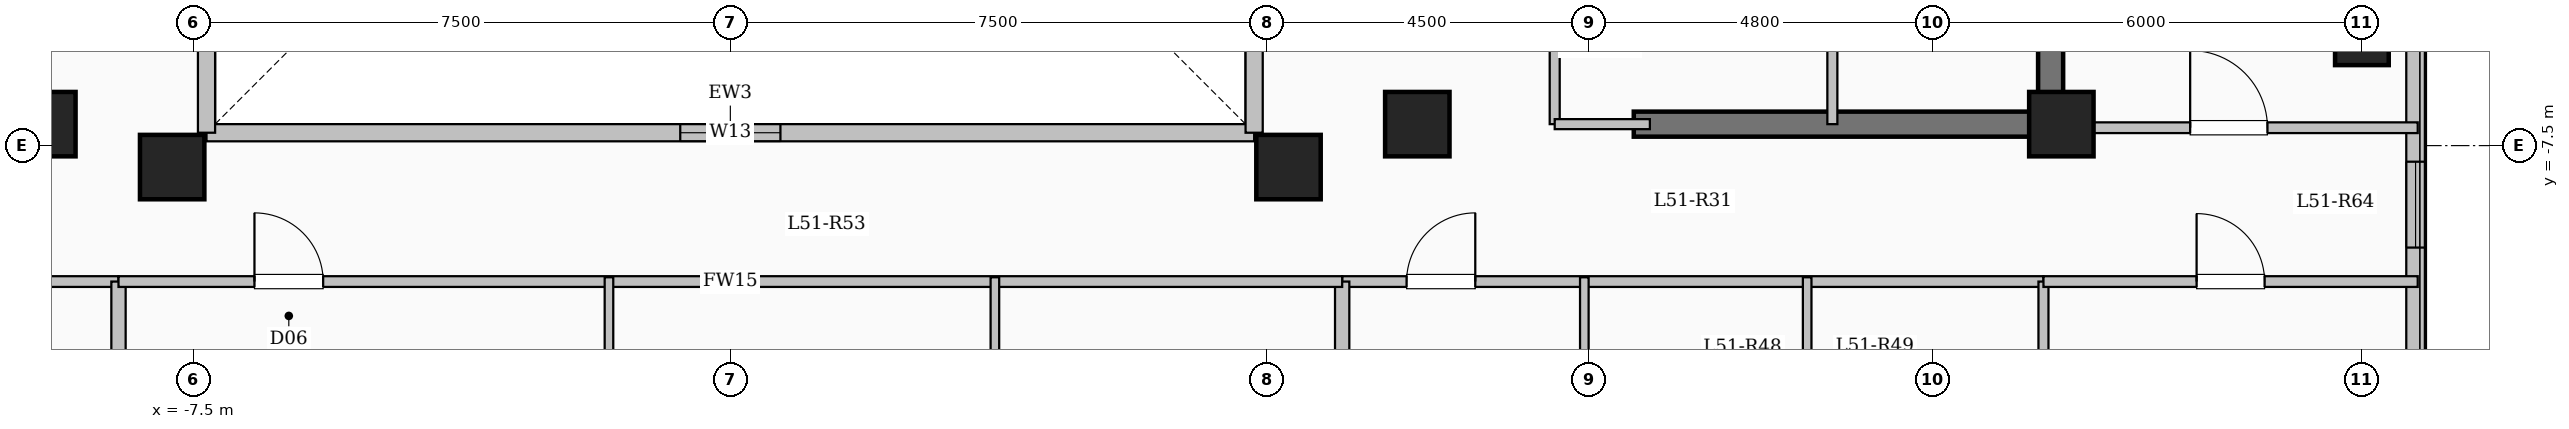
"""IFC4 building model, lengths in metres.
Left out: names, types, materials, properties, quantities, classifications, styles, units other than length and angle.
Written with IfcOpenShell. Run it as: python <this file> out.ifc"""

import sys

from ifc_helpers import new_model, si_unit, direction, frame, frame_2d, origin, origin_2d, place, context, subcontext, project, spatial, rectangle, extrude, element, fill, save


model = new_model("IFC4")
c1 = context("Model", 3, precision=1e-05, world=origin(), true_north=direction((0.0, 1.0)))
c2 = subcontext(c1, "Body", "Model", "MODEL_VIEW")
j1 = project(units=[si_unit("LENGTHUNIT", "METRE"), si_unit("PLANEANGLEUNIT", "RADIAN")], contexts=[c1])
p1 = place(None, origin())
s1 = spatial("IfcSite", under=j1, at=p1, CompositionType="ELEMENT")
p2 = place(p1, origin())
s2 = spatial("IfcBuilding", under=s1, at=p2, CompositionType="ELEMENT")
p3 = place(p2, frame((0.0, 0.0, 190.25)))
s3 = spatial("IfcBuildingStorey", under=s2, at=p3, CompositionType="ELEMENT", Elevation=190.25)
for number, where, z_axis, x_axis in (
    (1, (-7.8, -7.8, 0.0), (0.0, 0.0, 1.0), (1.0, 0.0, 0.0)),
    (2, (7.8, -7.8, 0.0), (0.0, 0.0, 1.0), (1.0, 0.0, 0.0)),
    (3, (-9.6, -7.2, 0.0), (0.0, 0.0, 1.0), (1.0, 0.0, 0.0)),
    (4, (9.6, -7.2, 0.0), (0.0, 0.0, 1.0), (1.0, 0.0, 0.0)),
    (5, (18.6, -7.2, 0.0), (0.0, 0.0, 1.0), (1.0, 0.0, 0.0)),
):
    element("IfcColumn", number, at=place(p3, frame(where, z_axis=z_axis, x_axis=x_axis)), inside=s3, PredefinedType="COLUMN", context=c2, shape_type="SweptSolid", body=[
        extrude(rectangle(XDim=0.9, YDim=0.9, at=origin_2d()), origin(), (0.0, 0.0, 1.0), 3.35),
    ])
p4 = place(p3, frame((22.8, -6.0, 0.0), z_axis=(0.0, 0.0, 1.0), x_axis=(1.0, 0.0, 0.0)))
e6 = element("IfcColumn", 6, at=p4, inside=s3, PredefinedType="COLUMN", context=c2, shape_type="SweptSolid", body=[
    extrude(rectangle(XDim=0.75, YDim=0.75, at=origin_2d()), origin(), (0.0, 0.0, 1.0), 3.35),
])
p5 = place(p3, frame((-7.32, -7.32, 0.0), z_axis=(0.0, 0.0, 1.0), x_axis=(1.0, 0.0, 0.0)))
e7 = element("IfcWall", 7, at=p5, inside=s3, PredefinedType="SOLIDWALL", context=c2, shape_type="SweptSolid", body=[
    extrude(rectangle(XDim=14.64, YDim=0.24, at=frame_2d((7.32, 0.0))), origin(), (0.0, 0.0, 1.0), 3.1),
])
p6 = place(p5, frame((6.62, 0.0, 0.95)))
e8 = element("IfcOpeningElement", 8, at=p6, cuts=e7, PredefinedType="OPENING", context=c2, shape_type="SweptSolid", body=[
    extrude(rectangle(XDim=1.4, YDim=1.5, at=frame_2d((0.7, 0.75))), frame((0.0, 0.13, 0.0), z_axis=(0.0, -1.0, 0.0), x_axis=(1.0, 0.0, 0.0)), (0.0, 0.0, 1.0), 0.26),
])
p7 = place(p3, frame((7.32, -7.32, 0.0), z_axis=(0.0, 0.0, 1.0), x_axis=(0.0, 1.0, 0.0)))
e9 = element("IfcWall", 9, at=p7, inside=s3, PredefinedType="SOLIDWALL", context=c2, shape_type="SweptSolid", body=[
    extrude(rectangle(XDim=14.64, YDim=0.24, at=frame_2d((7.32, 0.0))), origin(), (0.0, 0.0, 1.0), 3.1),
])
p8 = place(p7, frame((6.62, 0.0, 0.95)))
e10 = element("IfcOpeningElement", 10, at=p8, cuts=e9, PredefinedType="OPENING", context=c2, shape_type="SweptSolid", body=[
    extrude(rectangle(XDim=1.4, YDim=1.5, at=frame_2d((0.7, 0.75))), frame((0.0, 0.13, 0.0), z_axis=(0.0, -1.0, 0.0), x_axis=(1.0, 0.0, 0.0)), (0.0, 0.0, 1.0), 0.26),
])
p9 = place(p3, frame((-7.32, 7.32, 0.0), z_axis=(0.0, 0.0, 1.0), x_axis=(0.0, -1.0, 0.0)))
e11 = element("IfcWall", 11, at=p9, inside=s3, PredefinedType="SOLIDWALL", context=c2, shape_type="SweptSolid", body=[
    extrude(rectangle(XDim=14.64, YDim=0.24, at=frame_2d((7.32, 0.0))), origin(), (0.0, 0.0, 1.0), 3.1),
])
p10 = place(p9, frame((6.62, 0.0, 0.95)))
e12 = element("IfcOpeningElement", 12, at=p10, cuts=e11, PredefinedType="OPENING", context=c2, shape_type="SweptSolid", body=[
    extrude(rectangle(XDim=1.4, YDim=1.5, at=frame_2d((0.7, 0.75))), frame((0.0, 0.13, 0.0), z_axis=(0.0, -1.0, 0.0), x_axis=(1.0, 0.0, 0.0)), (0.0, 0.0, 1.0), 0.26),
])
p11 = place(p3, frame((23.55, 17.25, 0.0), z_axis=(0.0, 0.0, 1.0), x_axis=(0.0, -1.0, 0.0)))
e13 = element("IfcWall", 13, at=p11, inside=s3, PredefinedType="SOLIDWALL", context=c2, shape_type="SweptSolid", body=[
    extrude(rectangle(XDim=34.5, YDim=0.26, at=frame_2d((17.25, 0.0))), origin(), (0.0, 0.0, 1.0), 3.1),
])
p12 = place(p11, frame((1.375, 0.0, 0.9)))
e14 = element("IfcOpeningElement", 14, at=p12, cuts=e13, PredefinedType="OPENING", context=c2, shape_type="SweptSolid", body=[
    extrude(rectangle(XDim=2.0, YDim=1.7, at=frame_2d((1.0, 0.85))), frame((0.0, 0.14, 0.0), z_axis=(0.0, -1.0, 0.0), x_axis=(1.0, 0.0, 0.0)), (0.0, 0.0, 1.0), 0.28),
])
p13 = place(p11, frame((5.125, 0.0, 0.95)))
e15 = element("IfcOpeningElement", 15, at=p13, cuts=e13, PredefinedType="OPENING", context=c2, shape_type="SweptSolid", body=[
    extrude(rectangle(XDim=1.0, YDim=1.5, at=frame_2d((0.5, 0.75))), frame((0.0, 0.14, 0.0), z_axis=(0.0, -1.0, 0.0), x_axis=(1.0, 0.0, 0.0)), (0.0, 0.0, 1.0), 0.28),
])
p14 = place(p11, frame((14.5, 0.0, 0.9)))
e16 = element("IfcOpeningElement", 16, at=p14, cuts=e13, PredefinedType="OPENING", context=c2, shape_type="SweptSolid", body=[
    extrude(rectangle(XDim=2.0, YDim=1.7, at=frame_2d((1.0, 0.85))), frame((0.0, 0.14, 0.0), z_axis=(0.0, -1.0, 0.0), x_axis=(1.0, 0.0, 0.0)), (0.0, 0.0, 1.0), 0.28),
])
p15 = place(p11, frame((24.975, 0.0, 0.95)))
e17 = element("IfcOpeningElement", 17, at=p15, cuts=e13, PredefinedType="OPENING", context=c2, shape_type="SweptSolid", body=[
    extrude(rectangle(XDim=1.2, YDim=1.5, at=frame_2d((0.6, 0.75))), frame((0.0, 0.14, 0.0), z_axis=(0.0, -1.0, 0.0), x_axis=(1.0, 0.0, 0.0)), (0.0, 0.0, 1.0), 0.28),
])
p16 = place(p11, frame((29.475, 0.0, 0.9)))
e18 = element("IfcOpeningElement", 18, at=p16, cuts=e13, PredefinedType="OPENING", context=c2, shape_type="SweptSolid", body=[
    extrude(rectangle(XDim=2.2, YDim=1.75, at=frame_2d((1.1, 0.875))), frame((0.0, 0.14, 0.0), z_axis=(0.0, -1.0, 0.0), x_axis=(1.0, 0.0, 0.0)), (0.0, 0.0, 1.0), 0.28),
])
p17 = place(p3, frame((18.45, -7.375, 0.0), z_axis=(0.0, 0.0, 1.0), x_axis=(0.0, 1.0, 0.0)))
e19 = element("IfcWall", 19, at=p17, inside=s3, PredefinedType="SHEAR", context=c2, shape_type="SweptSolid", body=[
    extrude(rectangle(XDim=14.05, YDim=0.35, at=frame_2d((7.025, 0.0))), origin(), (0.0, 0.0, 1.0), 3.35),
])
p18 = place(p3, frame((12.625, -7.2, 0.0), z_axis=(0.0, 0.0, 1.0), x_axis=(1.0, 0.0, 0.0)))
e20 = element("IfcWall", 20, at=p18, inside=s3, PredefinedType="SHEAR", context=c2, shape_type="SweptSolid", body=[
    extrude(rectangle(XDim=6.0, YDim=0.35, at=frame_2d((3.0, 0.0))), origin(), (0.0, 0.0, 1.0), 3.35),
])
p19 = place(p3, frame((15.4, -7.2, 0.0), z_axis=(0.0, 0.0, 1.0), x_axis=(0.0, 1.0, 0.0)))
e21 = element("IfcWall", 21, at=p19, inside=s3, PredefinedType="PARTITIONING", context=c2, shape_type="SweptSolid", body=[
    extrude(rectangle(XDim=10.45, YDim=0.14, at=frame_2d((5.225, 0.0))), origin(), (0.0, 0.0, 1.0), 3.1),
])
p20 = place(p19, frame((9.25, 0.0, 0.0)))
e22 = element("IfcOpeningElement", 22, at=p20, cuts=e21, PredefinedType="OPENING", context=c2, shape_type="SweptSolid", body=[
    extrude(rectangle(XDim=0.9, YDim=2.08, at=frame_2d((0.45, 1.04))), frame((0.0, 0.08, 0.0), z_axis=(0.0, -1.0, 0.0), x_axis=(1.0, 0.0, 0.0)), (0.0, 0.0, 1.0), 0.16),
])
p21 = place(p3, frame((11.52, -7.2, 0.0), z_axis=(0.0, 0.0, 1.0), x_axis=(0.0, 1.0, 0.0)))
e23 = element("IfcWall", 23, at=p21, inside=s3, PredefinedType="PARTITIONING", context=c2, shape_type="SweptSolid", body=[
    extrude(rectangle(XDim=9.12, YDim=0.14, at=frame_2d((4.56, 0.0))), origin(), (0.0, 0.0, 1.0), 3.1),
])
p22 = place(p21, frame((1.8, 0.0, 0.0)))
e24 = element("IfcOpeningElement", 24, at=p22, cuts=e23, PredefinedType="OPENING", context=c2, shape_type="SweptSolid", body=[
    extrude(rectangle(XDim=0.9, YDim=2.08, at=frame_2d((0.45, 1.04))), frame((0.0, 0.08, 0.0), z_axis=(0.0, -1.0, 0.0), x_axis=(1.0, 0.0, 0.0)), (0.0, 0.0, 1.0), 0.16),
])
p23 = place(p21, frame((6.2, 0.0, 0.0)))
e25 = element("IfcOpeningElement", 25, at=p23, cuts=e23, PredefinedType="OPENING", context=c2, shape_type="SweptSolid", body=[
    extrude(rectangle(XDim=0.9, YDim=2.08, at=frame_2d((0.45, 1.04))), frame((0.0, 0.08, 0.0), z_axis=(0.0, -1.0, 0.0), x_axis=(1.0, 0.0, 0.0)), (0.0, 0.0, 1.0), 0.16),
])
p24 = place(p3, frame((11.52, -7.2, 0.0), z_axis=(0.0, 0.0, 1.0), x_axis=(1.0, 0.0, 0.0)))
e26 = element("IfcWall", 26, at=p24, inside=s3, PredefinedType="PARTITIONING", context=c2, shape_type="SweptSolid", body=[
    extrude(rectangle(XDim=1.33, YDim=0.14, at=frame_2d((0.665, 0.0))), origin(), (0.0, 0.0, 1.0), 2.235),
])
p25 = place(p3, frame((-18.35, -9.4, 0.0), z_axis=(0.0, 0.0, 1.0), x_axis=(1.0, 0.0, 0.0)))
e27 = element("IfcWall", 27, at=p25, inside=s3, PredefinedType="PARTITIONING", context=c2, shape_type="SweptSolid", body=[
    extrude(rectangle(XDim=9.8, YDim=0.15, at=frame_2d((4.9, 0.0))), origin(), (0.0, 0.0, 1.0), 3.1),
])
p26 = place(p25, frame((0.7, 0.0, 0.0)))
e28 = element("IfcOpeningElement", 28, at=p26, cuts=e27, PredefinedType="OPENING", context=c2, shape_type="SweptSolid", body=[
    extrude(rectangle(XDim=0.96, YDim=2.15, at=frame_2d((0.48, 1.075))), frame((0.0, 0.085, 0.0), z_axis=(0.0, -1.0, 0.0), x_axis=(1.0, 0.0, 0.0)), (0.0, 0.0, 1.0), 0.17),
])
p27 = place(p25, frame((5.38, 0.0, 0.0)))
e29 = element("IfcOpeningElement", 29, at=p27, cuts=e27, PredefinedType="OPENING", context=c2, shape_type="SweptSolid", body=[
    extrude(rectangle(XDim=0.96, YDim=2.15, at=frame_2d((0.48, 1.075))), frame((0.0, 0.085, 0.0), z_axis=(0.0, -1.0, 0.0), x_axis=(1.0, 0.0, 0.0)), (0.0, 0.0, 1.0), 0.17),
])
p28 = place(p3, frame((8.55, -9.4, 0.0), z_axis=(0.0, 0.0, 1.0), x_axis=(1.0, 0.0, 0.0)))
e30 = element("IfcWall", 30, at=p28, inside=s3, PredefinedType="PARTITIONING", context=c2, shape_type="SweptSolid", body=[
    extrude(rectangle(XDim=9.8, YDim=0.15, at=frame_2d((4.9, 0.0))), origin(), (0.0, 0.0, 1.0), 3.1),
])
p29 = place(p28, frame((0.9, 0.0, 0.0)))
e31 = element("IfcOpeningElement", 31, at=p29, cuts=e30, PredefinedType="OPENING", context=c2, shape_type="SweptSolid", body=[
    extrude(rectangle(XDim=0.96, YDim=2.15, at=frame_2d((0.48, 1.075))), frame((0.0, 0.085, 0.0), z_axis=(0.0, -1.0, 0.0), x_axis=(1.0, 0.0, 0.0)), (0.0, 0.0, 1.0), 0.17),
])
p30 = place(p3, frame((11.934, -20.9, 0.0), z_axis=(0.0, 0.0, 1.0), x_axis=(0.0, 1.0, 0.0)))
e32 = element("IfcWall", 32, at=p30, inside=s3, PredefinedType="PARTITIONING", context=c2, shape_type="SweptSolid", body=[
    extrude(rectangle(XDim=11.56, YDim=0.12, at=frame_2d((5.78, 0.0))), origin(), (0.0, 0.0, 1.0), 3.1),
])
p31 = place(p30, frame((7.225, 0.0, 0.0)))
e33 = element("IfcOpeningElement", 33, at=p31, cuts=e32, PredefinedType="OPENING", context=c2, shape_type="SweptSolid", body=[
    extrude(rectangle(XDim=1.08, YDim=2.15, at=frame_2d((0.54, 1.075))), frame((0.0, 0.07, 0.0), z_axis=(0.0, -1.0, 0.0), x_axis=(1.0, 0.0, 0.0)), (0.0, 0.0, 1.0), 0.14),
])
p32 = place(p3, frame((15.048, -12.31, 0.0), z_axis=(0.0, 0.0, 1.0), x_axis=(0.0, 1.0, 0.0)))
e34 = element("IfcWall", 34, at=p32, inside=s3, PredefinedType="PARTITIONING", context=c2, shape_type="SweptSolid", body=[
    extrude(rectangle(XDim=2.97, YDim=0.12, at=frame_2d((1.485, 0.0))), origin(), (0.0, 0.0, 1.0), 2.585),
])
for number, where, z_axis, x_axis in (
    (35, (-8.55, -21.504, 0.0), (0.0, 0.0, 1.0), (0.0, 1.0, 0.0)),
    (36, (8.55, -21.504, 0.0), (0.0, 0.0, 1.0), (0.0, 1.0, 0.0)),
):
    element("IfcWall", number, at=place(p3, frame(where, z_axis=z_axis, x_axis=x_axis)), inside=s3, PredefinedType="SOLIDWALL", context=c2, shape_type="SweptSolid", body=[
        extrude(rectangle(XDim=12.104, YDim=0.2, at=frame_2d((6.052, 0.0))), origin(), (0.0, 0.0, 1.0), 3.1),
    ])
p33 = place(p3, frame((-8.55, -9.4, 0.0), z_axis=(0.0, 0.0, 1.0), x_axis=(1.0, 0.0, 0.0)))
e37 = element("IfcWall", 37, at=p33, inside=s3, PredefinedType="PARTITIONING", context=c2, shape_type="SweptSolid", body=[
    extrude(rectangle(XDim=17.1, YDim=0.15, at=frame_2d((8.55, 0.0))), origin(), (0.0, 0.0, 1.0), 3.1),
])
p34 = place(p33, frame((1.9, 0.0, 0.0)))
e38 = element("IfcOpeningElement", 38, at=p34, cuts=e37, PredefinedType="OPENING", context=c2, shape_type="SweptSolid", body=[
    extrude(rectangle(XDim=0.96, YDim=2.15, at=frame_2d((0.48, 1.075))), frame((0.0, 0.085, 0.0), z_axis=(0.0, -1.0, 0.0), x_axis=(1.0, 0.0, 0.0)), (0.0, 0.0, 1.0), 0.17),
])
p35 = place(p3, frame((-1.696, -22.38, 0.0), z_axis=(0.0, 0.0, 1.0), x_axis=(0.0, 1.0, 0.0)))
e39 = element("IfcWall", 39, at=p35, inside=s3, PredefinedType="PARTITIONING", context=c2, shape_type="SweptSolid", body=[
    extrude(rectangle(XDim=13.04, YDim=0.12, at=frame_2d((6.52, 0.0))), origin(), (0.0, 0.0, 1.0), 3.1),
])
p36 = place(p35, frame((9.215, 0.0, 0.0)))
e40 = element("IfcOpeningElement", 40, at=p36, cuts=e39, PredefinedType="OPENING", context=c2, shape_type="SweptSolid", body=[
    extrude(rectangle(XDim=1.08, YDim=2.15, at=frame_2d((0.54, 1.075))), frame((0.0, 0.07, 0.0), z_axis=(0.0, -1.0, 0.0), x_axis=(1.0, 0.0, 0.0)), (0.0, 0.0, 1.0), 0.14),
])
p37 = place(p3, frame((3.697, -11.8, 0.0), z_axis=(0.0, 0.0, 1.0), x_axis=(0.0, 1.0, 0.0)))
e41 = element("IfcWall", 41, at=p37, inside=s3, PredefinedType="PARTITIONING", context=c2, shape_type="SweptSolid", body=[
    extrude(rectangle(XDim=2.46, YDim=0.12, at=frame_2d((1.23, 0.0))), origin(), (0.0, 0.0, 1.0), 3.1),
])
p38 = place(p3, frame((18.45, -7.25, 0.0), z_axis=(0.0, 0.0, 1.0), x_axis=(1.0, 0.0, 0.0)))
e42 = element("IfcWall", 42, at=p38, inside=s3, PredefinedType="PARTITIONING", context=c2, shape_type="SweptSolid", body=[
    extrude(rectangle(XDim=5.13, YDim=0.15, at=frame_2d((2.565, 0.0))), origin(), (0.0, 0.0, 1.0), 3.1),
])
p39 = place(p38, frame((1.95, 0.0, 0.0)))
e43 = element("IfcOpeningElement", 43, at=p39, cuts=e42, PredefinedType="OPENING", context=c2, shape_type="SweptSolid", body=[
    extrude(rectangle(XDim=1.08, YDim=2.15, at=frame_2d((0.54, 1.075))), frame((0.0, 0.085, 0.0), z_axis=(0.0, -1.0, 0.0), x_axis=(1.0, 0.0, 0.0)), (0.0, 0.0, 1.0), 0.17),
])
p40 = place(p3, frame((18.35, -17.25, 0.0), z_axis=(0.0, 0.0, 1.0), x_axis=(0.0, 1.0, 0.0)))
e44 = element("IfcWall", 44, at=p40, inside=s3, PredefinedType="PARTITIONING", context=c2, shape_type="SweptSolid", body=[
    extrude(rectangle(XDim=7.85, YDim=0.14, at=frame_2d((3.925, 0.0))), origin(), (0.0, 0.0, 1.0), 3.1),
])
p41 = place(p3, frame((18.35, -9.4, 0.0), z_axis=(0.0, 0.0, 1.0), x_axis=(1.0, 0.0, 0.0)))
e45 = element("IfcWall", 45, at=p41, inside=s3, PredefinedType="PARTITIONING", context=c2, shape_type="SweptSolid", body=[
    extrude(rectangle(XDim=5.23, YDim=0.15, at=frame_2d((2.615, 0.0))), origin(), (0.0, 0.0, 1.0), 3.1),
])
p42 = place(p41, frame((2.14, 0.0, 0.0)))
e46 = element("IfcOpeningElement", 46, at=p42, cuts=e45, PredefinedType="OPENING", context=c2, shape_type="SweptSolid", body=[
    extrude(rectangle(XDim=0.95, YDim=2.15, at=frame_2d((0.475, 1.075))), frame((0.0, 0.085, 0.0), z_axis=(0.0, -1.0, 0.0), x_axis=(1.0, 0.0, 0.0)), (0.0, 0.0, 1.0), 0.17),
])
p43 = place(p6, origin())
e47 = element("IfcWindow", 47, at=p43, inside=s3, PartitioningType="SINGLE_PANEL", PredefinedType="WINDOW", context=c2, shape_type="SweptSolid", body=[
    extrude(rectangle(XDim=1.4, YDim=1.5, at=frame_2d((0.7, 0.75))), frame((0.0, 0.03, 0.0), z_axis=(0.0, -1.0, 0.0), x_axis=(1.0, 0.0, 0.0)), (0.0, 0.0, 1.0), 0.06),
])
fill(e8, e47)
p44 = place(p15, origin())
e48 = element("IfcWindow", 48, at=p44, inside=s3, PartitioningType="SINGLE_PANEL", PredefinedType="WINDOW", context=c2, shape_type="SweptSolid", body=[
    extrude(rectangle(XDim=1.2, YDim=1.5, at=frame_2d((0.6, 0.75))), frame((0.0, 0.03, 0.0), z_axis=(0.0, -1.0, 0.0), x_axis=(1.0, 0.0, 0.0)), (0.0, 0.0, 1.0), 0.06),
])
fill(e17, e48)
p45 = place(p29, origin())
e49 = element("IfcDoor", 49, at=p45, inside=s3, OperationType="SINGLE_SWING_RIGHT", PredefinedType="DOOR", context=c2, shape_type="SweptSolid", body=[
    extrude(rectangle(XDim=0.96, YDim=2.15, at=frame_2d((0.48, 1.075))), frame((0.0, 0.025, 0.0), z_axis=(0.0, -1.0, 0.0), x_axis=(1.0, 0.0, 0.0)), (0.0, 0.0, 1.0), 0.05),
])
fill(e31, e49)
p46 = place(p34, origin())
e50 = element("IfcDoor", 50, at=p46, inside=s3, OperationType="SINGLE_SWING_LEFT", PredefinedType="DOOR", context=c2, shape_type="SweptSolid", body=[
    extrude(rectangle(XDim=0.96, YDim=2.15, at=frame_2d((0.48, 1.075))), frame((0.0, 0.025, 0.0), z_axis=(0.0, -1.0, 0.0), x_axis=(1.0, 0.0, 0.0)), (0.0, 0.0, 1.0), 0.05),
])
fill(e38, e50)
p47 = place(p42, origin())
e51 = element("IfcDoor", 51, at=p47, inside=s3, OperationType="SINGLE_SWING_LEFT", PredefinedType="DOOR", context=c2, shape_type="SweptSolid", body=[
    extrude(rectangle(XDim=0.95, YDim=2.15, at=frame_2d((0.475, 1.075))), frame((0.0, 0.025, 0.0), z_axis=(0.0, -1.0, 0.0), x_axis=(1.0, 0.0, 0.0)), (0.0, 0.0, 1.0), 0.05),
])
fill(e46, e51)
p48 = place(p39, origin())
e52 = element("IfcDoor", 52, at=p48, inside=s3, OperationType="SINGLE_SWING_LEFT", PredefinedType="DOOR", context=c2, shape_type="SweptSolid", body=[
    extrude(rectangle(XDim=1.08, YDim=2.15, at=frame_2d((0.54, 1.075))), frame((0.0, 0.025, 0.0), z_axis=(0.0, -1.0, 0.0), x_axis=(1.0, 0.0, 0.0)), (0.0, 0.0, 1.0), 0.05),
])
fill(e43, e52)
save(model, sys.argv[1])
